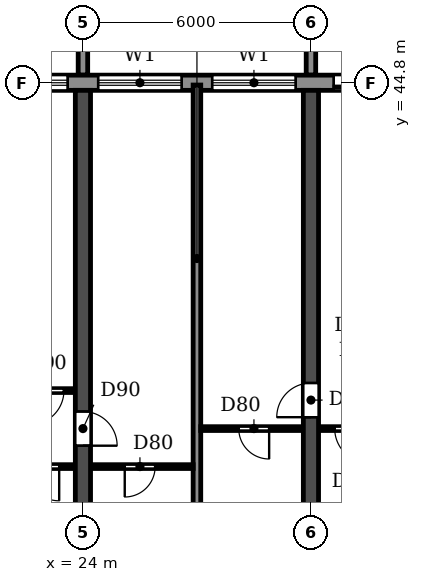
"""IFC4 building model, lengths in metres.
Left out: names, types, materials, properties, quantities, classifications, styles, units other than length and angle.
Written with IfcOpenShell. Run it as: python <this file> out.ifc"""

import sys

from ifc_helpers import new_model, si_unit, direction, frame, frame_2d, origin, place, context, subcontext, project, spatial, polyline, rectangle, outline, extrude, source, transform, mapped, element, fill, save


model = new_model("IFC4")
c1 = context("Model", 3, precision=1e-05, world=origin(), true_north=direction((0.0, 1.0)))
c2 = subcontext(c1, "Body", "Model", "MODEL_VIEW")
j1 = project(units=[si_unit("LENGTHUNIT", "METRE"), si_unit("PLANEANGLEUNIT", "RADIAN")], contexts=[c1])
p1 = place(None, origin())
s1 = spatial("IfcSite", under=j1, at=p1, CompositionType="ELEMENT")
p2 = place(p1, origin())
s2 = spatial("IfcBuilding", under=s1, at=p2, CompositionType="ELEMENT")
p3 = place(p2, frame((0.0, 0.0, 26.7)))
s3 = spatial("IfcBuildingStorey", under=s2, at=p3, CompositionType="ELEMENT", Elevation=26.7)
p4 = place(p3, frame((24.0, 30.55, 0.0), z_axis=(0.0, 0.0, 1.0), x_axis=(0.0, 1.0, 0.0)))
e1 = element("IfcWall", 1, at=p4, inside=s3, PredefinedType="SHEAR", context=c2, shape_type="SweptSolid", body=[
    extrude(rectangle(XDim=14.05, YDim=0.4, at=frame_2d((7.025, 0.0))), origin(), (0.0, 0.0, 1.0), 3.05),
])
p5 = place(p4, frame((4.7, 0.0, 0.0)))
e2 = element("IfcOpeningElement", 2, at=p5, cuts=e1, PredefinedType="OPENING", context=c2, shape_type="SweptSolid", body=[
    extrude(rectangle(XDim=0.9, YDim=2.1, at=frame_2d((0.45, 1.05))), frame((0.0, 0.21, 0.0), z_axis=(0.0, -1.0, 0.0), x_axis=(1.0, 0.0, 0.0)), (0.0, 0.0, 1.0), 0.42),
])
p6 = place(p3, frame((30.0, 30.55, 0.0), z_axis=(0.0, 0.0, 1.0), x_axis=(0.0, 1.0, 0.0)))
e3 = element("IfcWall", 3, at=p6, inside=s3, PredefinedType="SHEAR", context=c2, shape_type="SweptSolid", body=[
    extrude(rectangle(XDim=14.05, YDim=0.4, at=frame_2d((7.025, 0.0))), origin(), (0.0, 0.0, 1.0), 3.05),
])
p7 = place(p6, frame((5.45, 0.0, 0.0)))
e4 = element("IfcOpeningElement", 4, at=p7, cuts=e3, PredefinedType="OPENING", context=c2, shape_type="SweptSolid", body=[
    extrude(rectangle(XDim=0.9, YDim=2.1, at=frame_2d((0.45, 1.05))), frame((0.0, 0.21, 0.0), z_axis=(0.0, -1.0, 0.0), x_axis=(1.0, 0.0, 0.0)), (0.0, 0.0, 1.0), 0.42),
])
p8 = place(p3, frame((97.317, 44.8, 0.0), z_axis=(0.0, 0.0, 1.0), x_axis=(-1.0, 0.0, 0.0)))
e5 = element("IfcWall", 5, at=p8, inside=s3, PredefinedType="STANDARD", context=c2, shape_type="SweptSolid", body=[
    extrude(rectangle(XDim=92.634, YDim=0.4, at=frame_2d((46.317, 0.0))), origin(), (0.0, 0.0, 1.0), 3.05),
])
p9 = place(p8, frame((88.717, 0.0, 0.9)))
e6 = element("IfcOpeningElement", 6, at=p9, cuts=e5, PredefinedType="OPENING", context=c2, shape_type="SweptSolid", body=[
    extrude(rectangle(XDim=2.2, YDim=1.5, at=frame_2d((1.1, 0.75))), frame((0.0, 0.21, 0.0), z_axis=(0.0, -1.0, 0.0), x_axis=(1.0, 0.0, 0.0)), (0.0, 0.0, 1.0), 0.42),
])
p10 = place(p8, frame((85.917, 0.0, 0.0)))
e7 = element("IfcOpeningElement", 7, at=p10, cuts=e5, PredefinedType="OPENING", context=c2, shape_type="SweptSolid", body=[
    extrude(rectangle(XDim=1.8, YDim=2.4, at=frame_2d((0.9, 1.2))), frame((0.0, 0.21, 0.0), z_axis=(0.0, -1.0, 0.0), x_axis=(1.0, 0.0, 0.0)), (0.0, 0.0, 1.0), 0.42),
])
p11 = place(p8, frame((82.717, 0.0, 0.9)))
e8 = element("IfcOpeningElement", 8, at=p11, cuts=e5, PredefinedType="OPENING", context=c2, shape_type="SweptSolid", body=[
    extrude(rectangle(XDim=2.2, YDim=1.5, at=frame_2d((1.1, 0.75))), frame((0.0, 0.21, 0.0), z_axis=(0.0, -1.0, 0.0), x_axis=(1.0, 0.0, 0.0)), (0.0, 0.0, 1.0), 0.42),
])
p12 = place(p8, frame((79.717, 0.0, 0.9)))
e9 = element("IfcOpeningElement", 9, at=p12, cuts=e5, PredefinedType="OPENING", context=c2, shape_type="SweptSolid", body=[
    extrude(rectangle(XDim=2.2, YDim=1.5, at=frame_2d((1.1, 0.75))), frame((0.0, 0.21, 0.0), z_axis=(0.0, -1.0, 0.0), x_axis=(1.0, 0.0, 0.0)), (0.0, 0.0, 1.0), 0.42),
])
p13 = place(p8, frame((76.917, 0.0, 0.0)))
e10 = element("IfcOpeningElement", 10, at=p13, cuts=e5, PredefinedType="OPENING", context=c2, shape_type="SweptSolid", body=[
    extrude(rectangle(XDim=1.8, YDim=2.4, at=frame_2d((0.9, 1.2))), frame((0.0, 0.21, 0.0), z_axis=(0.0, -1.0, 0.0), x_axis=(1.0, 0.0, 0.0)), (0.0, 0.0, 1.0), 0.42),
])
p14 = place(p8, frame((73.717, 0.0, 0.9)))
e11 = element("IfcOpeningElement", 11, at=p14, cuts=e5, PredefinedType="OPENING", context=c2, shape_type="SweptSolid", body=[
    extrude(rectangle(XDim=2.2, YDim=1.5, at=frame_2d((1.1, 0.75))), frame((0.0, 0.21, 0.0), z_axis=(0.0, -1.0, 0.0), x_axis=(1.0, 0.0, 0.0)), (0.0, 0.0, 1.0), 0.42),
])
p15 = place(p8, frame((70.717, 0.0, 0.9)))
e12 = element("IfcOpeningElement", 12, at=p15, cuts=e5, PredefinedType="OPENING", context=c2, shape_type="SweptSolid", body=[
    extrude(rectangle(XDim=2.2, YDim=1.5, at=frame_2d((1.1, 0.75))), frame((0.0, 0.21, 0.0), z_axis=(0.0, -1.0, 0.0), x_axis=(1.0, 0.0, 0.0)), (0.0, 0.0, 1.0), 0.42),
])
p16 = place(p8, frame((67.717, 0.0, 0.9)))
e13 = element("IfcOpeningElement", 13, at=p16, cuts=e5, PredefinedType="OPENING", context=c2, shape_type="SweptSolid", body=[
    extrude(rectangle(XDim=2.2, YDim=1.5, at=frame_2d((1.1, 0.75))), frame((0.0, 0.21, 0.0), z_axis=(0.0, -1.0, 0.0), x_axis=(1.0, 0.0, 0.0)), (0.0, 0.0, 1.0), 0.42),
])
p17 = place(p8, frame((64.917, 0.0, 0.0)))
e14 = element("IfcOpeningElement", 14, at=p17, cuts=e5, PredefinedType="OPENING", context=c2, shape_type="SweptSolid", body=[
    extrude(rectangle(XDim=1.8, YDim=2.4, at=frame_2d((0.9, 1.2))), frame((0.0, 0.21, 0.0), z_axis=(0.0, -1.0, 0.0), x_axis=(1.0, 0.0, 0.0)), (0.0, 0.0, 1.0), 0.42),
])
p18 = place(p8, frame((61.717, 0.0, 0.9)))
e15 = element("IfcOpeningElement", 15, at=p18, cuts=e5, PredefinedType="OPENING", context=c2, shape_type="SweptSolid", body=[
    extrude(rectangle(XDim=2.2, YDim=1.5, at=frame_2d((1.1, 0.75))), frame((0.0, 0.21, 0.0), z_axis=(0.0, -1.0, 0.0), x_axis=(1.0, 0.0, 0.0)), (0.0, 0.0, 1.0), 0.42),
])
p19 = place(p8, frame((58.717, 0.0, 0.9)))
e16 = element("IfcOpeningElement", 16, at=p19, cuts=e5, PredefinedType="OPENING", context=c2, shape_type="SweptSolid", body=[
    extrude(rectangle(XDim=2.2, YDim=1.5, at=frame_2d((1.1, 0.75))), frame((0.0, 0.21, 0.0), z_axis=(0.0, -1.0, 0.0), x_axis=(1.0, 0.0, 0.0)), (0.0, 0.0, 1.0), 0.42),
])
p20 = place(p8, frame((55.917, 0.0, 0.0)))
e17 = element("IfcOpeningElement", 17, at=p20, cuts=e5, PredefinedType="OPENING", context=c2, shape_type="SweptSolid", body=[
    extrude(rectangle(XDim=1.8, YDim=2.4, at=frame_2d((0.9, 1.2))), frame((0.0, 0.21, 0.0), z_axis=(0.0, -1.0, 0.0), x_axis=(1.0, 0.0, 0.0)), (0.0, 0.0, 1.0), 0.42),
])
p21 = place(p8, frame((52.917, 0.0, 0.0)))
e18 = element("IfcOpeningElement", 18, at=p21, cuts=e5, PredefinedType="OPENING", context=c2, shape_type="SweptSolid", body=[
    extrude(rectangle(XDim=1.8, YDim=2.4, at=frame_2d((0.9, 1.2))), frame((0.0, 0.21, 0.0), z_axis=(0.0, -1.0, 0.0), x_axis=(1.0, 0.0, 0.0)), (0.0, 0.0, 1.0), 0.42),
])
p22 = place(p8, frame((49.717, 0.0, 0.9)))
e19 = element("IfcOpeningElement", 19, at=p22, cuts=e5, PredefinedType="OPENING", context=c2, shape_type="SweptSolid", body=[
    extrude(rectangle(XDim=2.2, YDim=1.5, at=frame_2d((1.1, 0.75))), frame((0.0, 0.21, 0.0), z_axis=(0.0, -1.0, 0.0), x_axis=(1.0, 0.0, 0.0)), (0.0, 0.0, 1.0), 0.42),
])
p23 = place(p8, frame((46.917, 0.0, 0.0)))
e20 = element("IfcOpeningElement", 20, at=p23, cuts=e5, PredefinedType="OPENING", context=c2, shape_type="SweptSolid", body=[
    extrude(rectangle(XDim=1.8, YDim=2.4, at=frame_2d((0.9, 1.2))), frame((0.0, 0.21, 0.0), z_axis=(0.0, -1.0, 0.0), x_axis=(1.0, 0.0, 0.0)), (0.0, 0.0, 1.0), 0.42),
])
p24 = place(p8, frame((43.717, 0.0, 0.9)))
e21 = element("IfcOpeningElement", 21, at=p24, cuts=e5, PredefinedType="OPENING", context=c2, shape_type="SweptSolid", body=[
    extrude(rectangle(XDim=2.2, YDim=1.5, at=frame_2d((1.1, 0.75))), frame((0.0, 0.21, 0.0), z_axis=(0.0, -1.0, 0.0), x_axis=(1.0, 0.0, 0.0)), (0.0, 0.0, 1.0), 0.42),
])
p25 = place(p8, frame((40.717, 0.0, 0.9)))
e22 = element("IfcOpeningElement", 22, at=p25, cuts=e5, PredefinedType="OPENING", context=c2, shape_type="SweptSolid", body=[
    extrude(rectangle(XDim=2.2, YDim=1.5, at=frame_2d((1.1, 0.75))), frame((0.0, 0.21, 0.0), z_axis=(0.0, -1.0, 0.0), x_axis=(1.0, 0.0, 0.0)), (0.0, 0.0, 1.0), 0.42),
])
p26 = place(p8, frame((37.917, 0.0, 0.0)))
e23 = element("IfcOpeningElement", 23, at=p26, cuts=e5, PredefinedType="OPENING", context=c2, shape_type="SweptSolid", body=[
    extrude(rectangle(XDim=1.8, YDim=2.4, at=frame_2d((0.9, 1.2))), frame((0.0, 0.21, 0.0), z_axis=(0.0, -1.0, 0.0), x_axis=(1.0, 0.0, 0.0)), (0.0, 0.0, 1.0), 0.42),
])
p27 = place(p8, frame((34.917, 0.0, 0.0)))
e24 = element("IfcOpeningElement", 24, at=p27, cuts=e5, PredefinedType="OPENING", context=c2, shape_type="SweptSolid", body=[
    extrude(rectangle(XDim=1.8, YDim=2.4, at=frame_2d((0.9, 1.2))), frame((0.0, 0.21, 0.0), z_axis=(0.0, -1.0, 0.0), x_axis=(1.0, 0.0, 0.0)), (0.0, 0.0, 1.0), 0.42),
])
p28 = place(p8, frame((31.717, 0.0, 0.9)))
e25 = element("IfcOpeningElement", 25, at=p28, cuts=e5, PredefinedType="OPENING", context=c2, shape_type="SweptSolid", body=[
    extrude(rectangle(XDim=2.2, YDim=1.5, at=frame_2d((1.1, 0.75))), frame((0.0, 0.21, 0.0), z_axis=(0.0, -1.0, 0.0), x_axis=(1.0, 0.0, 0.0)), (0.0, 0.0, 1.0), 0.42),
])
p29 = place(p8, frame((28.717, 0.0, 0.9)))
e26 = element("IfcOpeningElement", 26, at=p29, cuts=e5, PredefinedType="OPENING", context=c2, shape_type="SweptSolid", body=[
    extrude(rectangle(XDim=2.2, YDim=1.5, at=frame_2d((1.1, 0.75))), frame((0.0, 0.21, 0.0), z_axis=(0.0, -1.0, 0.0), x_axis=(1.0, 0.0, 0.0)), (0.0, 0.0, 1.0), 0.42),
])
p30 = place(p8, frame((25.717, 0.0, 0.9)))
e27 = element("IfcOpeningElement", 27, at=p30, cuts=e5, PredefinedType="OPENING", context=c2, shape_type="SweptSolid", body=[
    extrude(rectangle(XDim=2.2, YDim=1.5, at=frame_2d((1.1, 0.75))), frame((0.0, 0.21, 0.0), z_axis=(0.0, -1.0, 0.0), x_axis=(1.0, 0.0, 0.0)), (0.0, 0.0, 1.0), 0.42),
])
p31 = place(p8, frame((22.717, 0.0, 0.9)))
e28 = element("IfcOpeningElement", 28, at=p31, cuts=e5, PredefinedType="OPENING", context=c2, shape_type="SweptSolid", body=[
    extrude(rectangle(XDim=2.2, YDim=1.5, at=frame_2d((1.1, 0.75))), frame((0.0, 0.21, 0.0), z_axis=(0.0, -1.0, 0.0), x_axis=(1.0, 0.0, 0.0)), (0.0, 0.0, 1.0), 0.42),
])
p32 = place(p8, frame((19.917, 0.0, 0.0)))
e29 = element("IfcOpeningElement", 29, at=p32, cuts=e5, PredefinedType="OPENING", context=c2, shape_type="SweptSolid", body=[
    extrude(rectangle(XDim=1.8, YDim=2.4, at=frame_2d((0.9, 1.2))), frame((0.0, 0.21, 0.0), z_axis=(0.0, -1.0, 0.0), x_axis=(1.0, 0.0, 0.0)), (0.0, 0.0, 1.0), 0.42),
])
p33 = place(p8, frame((16.717, 0.0, 0.9)))
e30 = element("IfcOpeningElement", 30, at=p33, cuts=e5, PredefinedType="OPENING", context=c2, shape_type="SweptSolid", body=[
    extrude(rectangle(XDim=2.2, YDim=1.5, at=frame_2d((1.1, 0.75))), frame((0.0, 0.21, 0.0), z_axis=(0.0, -1.0, 0.0), x_axis=(1.0, 0.0, 0.0)), (0.0, 0.0, 1.0), 0.42),
])
p34 = place(p8, frame((13.717, 0.0, 0.9)))
e31 = element("IfcOpeningElement", 31, at=p34, cuts=e5, PredefinedType="OPENING", context=c2, shape_type="SweptSolid", body=[
    extrude(rectangle(XDim=2.2, YDim=1.5, at=frame_2d((1.1, 0.75))), frame((0.0, 0.21, 0.0), z_axis=(0.0, -1.0, 0.0), x_axis=(1.0, 0.0, 0.0)), (0.0, 0.0, 1.0), 0.42),
])
p35 = place(p8, frame((10.717, 0.0, 0.9)))
e32 = element("IfcOpeningElement", 32, at=p35, cuts=e5, PredefinedType="OPENING", context=c2, shape_type="SweptSolid", body=[
    extrude(rectangle(XDim=2.2, YDim=1.5, at=frame_2d((1.1, 0.75))), frame((0.0, 0.21, 0.0), z_axis=(0.0, -1.0, 0.0), x_axis=(1.0, 0.0, 0.0)), (0.0, 0.0, 1.0), 0.42),
])
p36 = place(p8, frame((7.917, 0.0, 0.0)))
e33 = element("IfcOpeningElement", 33, at=p36, cuts=e5, PredefinedType="OPENING", context=c2, shape_type="SweptSolid", body=[
    extrude(rectangle(XDim=1.8, YDim=2.4, at=frame_2d((0.9, 1.2))), frame((0.0, 0.21, 0.0), z_axis=(0.0, -1.0, 0.0), x_axis=(1.0, 0.0, 0.0)), (0.0, 0.0, 1.0), 0.42),
])
p37 = place(p8, frame((4.917, 0.0, 0.0)))
e34 = element("IfcOpeningElement", 34, at=p37, cuts=e5, PredefinedType="OPENING", context=c2, shape_type="SweptSolid", body=[
    extrude(rectangle(XDim=1.8, YDim=2.4, at=frame_2d((0.9, 1.2))), frame((0.0, 0.21, 0.0), z_axis=(0.0, -1.0, 0.0), x_axis=(1.0, 0.0, 0.0)), (0.0, 0.0, 1.0), 0.42),
])
p38 = place(p8, frame((1.717, 0.0, 0.9)))
e35 = element("IfcOpeningElement", 35, at=p38, cuts=e5, PredefinedType="OPENING", context=c2, shape_type="SweptSolid", body=[
    extrude(rectangle(XDim=2.2, YDim=1.5, at=frame_2d((1.1, 0.75))), frame((0.0, 0.21, 0.0), z_axis=(0.0, -1.0, 0.0), x_axis=(1.0, 0.0, 0.0)), (0.0, 0.0, 1.0), 0.42),
])
m1 = source(origin(), c2, "Body", "SweptSolid", [
    extrude(outline(polyline([(0.0, 0.0), (0.25, 0.0), (0.25, 3.1), (0.0, 3.1), (0.0, 0.0)])), origin(), (0.0, 0.0, 1.0), 3.1),
])
for number, where in (
    (36, (23.875, 45.0, 0.0)),
    (37, (29.875, 45.0, 0.0)),
):
    element("IfcWall", number, at=place(p3, frame(where)), inside=s3, PredefinedType="STANDARD", context=c2, shape_type="MappedRepresentation", body=[
        mapped(m1, transform((0.0, 0.0, 0.0))),
    ])
p39 = place(p3, frame((27.0, 30.56, 0.0), z_axis=(0.0, 0.0, 1.0), x_axis=(0.0, 1.0, 0.0)))
e38 = element("IfcWall", 38, at=p39, inside=s3, PredefinedType="PARTITIONING", context=c2, shape_type="SweptSolid", body=[
    extrude(rectangle(XDim=14.18, YDim=0.2, at=frame_2d((7.09, 0.0))), origin(), (0.0, 0.0, 1.0), 3.05),
])
p40 = place(p3, frame((21.8, 34.7, 0.0), z_axis=(0.0, 0.0, 1.0), x_axis=(1.0, 0.0, 0.0)))
e39 = element("IfcWall", 39, at=p40, inside=s3, PredefinedType="PARTITIONING", context=c2, shape_type="SweptSolid", body=[
    extrude(rectangle(XDim=1.99, YDim=0.1, at=frame_2d((0.995, 0.0))), origin(), (0.0, 0.0, 1.0), 3.05),
])
p41 = place(p40, frame((0.675, 0.0, 0.0)))
e40 = element("IfcOpeningElement", 40, at=p41, cuts=e39, PredefinedType="OPENING", context=c2, shape_type="SweptSolid", body=[
    extrude(rectangle(XDim=0.9, YDim=2.1, at=frame_2d((0.45, 1.05))), frame((0.0, 0.06, 0.0), z_axis=(0.0, -1.0, 0.0), x_axis=(1.0, 0.0, 0.0)), (0.0, 0.0, 1.0), 0.12),
])
p42 = place(p3, frame((24.21, 34.7, 0.0), z_axis=(0.0, 0.0, 1.0), x_axis=(1.0, 0.0, 0.0)))
e41 = element("IfcWall", 41, at=p42, inside=s3, PredefinedType="PARTITIONING", context=c2, shape_type="SweptSolid", body=[
    extrude(rectangle(XDim=2.69, YDim=0.1, at=frame_2d((1.345, 0.0))), origin(), (0.0, 0.0, 1.0), 3.05),
])
p43 = place(p42, frame((0.89, 0.0, 0.0)))
e42 = element("IfcOpeningElement", 42, at=p43, cuts=e41, PredefinedType="OPENING", context=c2, shape_type="SweptSolid", body=[
    extrude(rectangle(XDim=0.8, YDim=2.1, at=frame_2d((0.4, 1.05))), frame((0.0, 0.06, 0.0), z_axis=(0.0, -1.0, 0.0), x_axis=(1.0, 0.0, 0.0)), (0.0, 0.0, 1.0), 0.12),
])
p44 = place(p3, frame((27.1, 35.7, 0.0), z_axis=(0.0, 0.0, 1.0), x_axis=(1.0, 0.0, 0.0)))
e43 = element("IfcWall", 43, at=p44, inside=s3, PredefinedType="PARTITIONING", context=c2, shape_type="SweptSolid", body=[
    extrude(rectangle(XDim=2.69, YDim=0.1, at=frame_2d((1.345, 0.0))), origin(), (0.0, 0.0, 1.0), 3.05),
])
p45 = place(p44, frame((1.0, 0.0, 0.0)))
e44 = element("IfcOpeningElement", 44, at=p45, cuts=e43, PredefinedType="OPENING", context=c2, shape_type="SweptSolid", body=[
    extrude(rectangle(XDim=0.8, YDim=2.1, at=frame_2d((0.4, 1.05))), frame((0.0, 0.06, 0.0), z_axis=(0.0, -1.0, 0.0), x_axis=(1.0, 0.0, 0.0)), (0.0, 0.0, 1.0), 0.12),
])
p46 = place(p3, frame((30.21, 35.7, 0.0), z_axis=(0.0, 0.0, 1.0), x_axis=(1.0, 0.0, 0.0)))
e45 = element("IfcWall", 45, at=p46, inside=s3, PredefinedType="PARTITIONING", context=c2, shape_type="SweptSolid", body=[
    extrude(rectangle(XDim=1.99, YDim=0.1, at=frame_2d((0.995, 0.0))), origin(), (0.0, 0.0, 1.0), 3.05),
])
p47 = place(p46, frame((0.415, 0.0, 0.0)))
e46 = element("IfcOpeningElement", 46, at=p47, cuts=e45, PredefinedType="OPENING", context=c2, shape_type="SweptSolid", body=[
    extrude(rectangle(XDim=0.9, YDim=2.1, at=frame_2d((0.45, 1.05))), frame((0.0, 0.06, 0.0), z_axis=(0.0, -1.0, 0.0), x_axis=(1.0, 0.0, 0.0)), (0.0, 0.0, 1.0), 0.12),
])
p48 = place(p3, frame((20.95, 36.7, 0.0), z_axis=(0.0, 0.0, 1.0), x_axis=(1.0, 0.0, 0.0)))
e47 = element("IfcWall", 47, at=p48, inside=s3, PredefinedType="PARTITIONING", context=c2, shape_type="SweptSolid", body=[
    extrude(rectangle(XDim=2.84, YDim=0.1, at=frame_2d((1.42, 0.0))), origin(), (0.0, 0.0, 1.0), 3.05),
])
p49 = place(p48, frame((1.65, 0.0, 0.0)))
e48 = element("IfcOpeningElement", 48, at=p49, cuts=e47, PredefinedType="OPENING", context=c2, shape_type="SweptSolid", body=[
    extrude(rectangle(XDim=0.9, YDim=2.1, at=frame_2d((0.45, 1.05))), frame((0.0, 0.06, 0.0), z_axis=(0.0, -1.0, 0.0), x_axis=(1.0, 0.0, 0.0)), (0.0, 0.0, 1.0), 0.12),
])
p50 = place(p14, origin())
e49 = element("IfcWindow", 49, at=p50, inside=s3, PartitioningType="DOUBLE_PANEL_HORIZONTAL", PredefinedType="WINDOW", context=c2, shape_type="SweptSolid", body=[
    extrude(rectangle(XDim=2.2, YDim=1.5, at=frame_2d((1.1, 0.75))), frame((0.0, 0.03, 0.0), z_axis=(0.0, -1.0, 0.0), x_axis=(1.0, 0.0, 0.0)), (0.0, 0.0, 1.0), 0.06),
])
fill(e11, e49)
p51 = place(p15, origin())
e50 = element("IfcWindow", 50, at=p51, inside=s3, PartitioningType="DOUBLE_PANEL_HORIZONTAL", PredefinedType="WINDOW", context=c2, shape_type="SweptSolid", body=[
    extrude(rectangle(XDim=2.2, YDim=1.5, at=frame_2d((1.1, 0.75))), frame((0.0, 0.03, 0.0), z_axis=(0.0, -1.0, 0.0), x_axis=(1.0, 0.0, 0.0)), (0.0, 0.0, 1.0), 0.06),
])
fill(e12, e50)
p52 = place(p16, origin())
e51 = element("IfcWindow", 51, at=p52, inside=s3, PartitioningType="DOUBLE_PANEL_HORIZONTAL", PredefinedType="WINDOW", context=c2, shape_type="SweptSolid", body=[
    extrude(rectangle(XDim=2.2, YDim=1.5, at=frame_2d((1.1, 0.75))), frame((0.0, 0.03, 0.0), z_axis=(0.0, -1.0, 0.0), x_axis=(1.0, 0.0, 0.0)), (0.0, 0.0, 1.0), 0.06),
])
fill(e13, e51)
p53 = place(p17, origin())
e52 = element("IfcDoor", 52, at=p53, inside=s3, OperationType="DOUBLE_DOOR_SLIDING", PredefinedType="DOOR", context=c2, shape_type="SweptSolid", body=[
    extrude(rectangle(XDim=1.8, YDim=2.4, at=frame_2d((0.9, 1.2))), frame((0.0, 0.025, 0.0), z_axis=(0.0, -1.0, 0.0), x_axis=(1.0, 0.0, 0.0)), (0.0, 0.0, 1.0), 0.05),
])
fill(e14, e52)
p54 = place(p43, frame((0.8, 0.0, 0.0), z_axis=(0.0, 0.0, 1.0), x_axis=(-1.0, 0.0, 0.0)))
e53 = element("IfcDoor", 53, at=p54, inside=s3, OperationType="SINGLE_SWING_RIGHT", PredefinedType="DOOR", context=c2, shape_type="SweptSolid", body=[
    extrude(rectangle(XDim=0.8, YDim=2.1, at=frame_2d((0.4, 1.05))), frame((0.0, 0.025, 0.0), z_axis=(0.0, -1.0, 0.0), x_axis=(1.0, 0.0, 0.0)), (0.0, 0.0, 1.0), 0.05),
])
fill(e42, e53)
p55 = place(p41, frame((0.9, 0.0, 0.0), z_axis=(0.0, 0.0, 1.0), x_axis=(-1.0, 0.0, 0.0)))
e54 = element("IfcDoor", 54, at=p55, inside=s3, OperationType="SINGLE_SWING_LEFT", PredefinedType="DOOR", context=c2, shape_type="SweptSolid", body=[
    extrude(rectangle(XDim=0.9, YDim=2.1, at=frame_2d((0.45, 1.05))), frame((0.0, 0.025, 0.0), z_axis=(0.0, -1.0, 0.0), x_axis=(1.0, 0.0, 0.0)), (0.0, 0.0, 1.0), 0.05),
])
fill(e40, e54)
p56 = place(p49, frame((0.9, 0.0, 0.0), z_axis=(0.0, 0.0, 1.0), x_axis=(-1.0, 0.0, 0.0)))
e55 = element("IfcDoor", 55, at=p56, inside=s3, OperationType="SINGLE_SWING_RIGHT", PredefinedType="DOOR", context=c2, shape_type="SweptSolid", body=[
    extrude(rectangle(XDim=0.9, YDim=2.1, at=frame_2d((0.45, 1.05))), frame((0.0, 0.025, 0.0), z_axis=(0.0, -1.0, 0.0), x_axis=(1.0, 0.0, 0.0)), (0.0, 0.0, 1.0), 0.05),
])
fill(e48, e55)
p57 = place(p5, frame((0.9, 0.0, 0.0), z_axis=(0.0, 0.0, 1.0), x_axis=(-1.0, 0.0, 0.0)))
e56 = element("IfcDoor", 56, at=p57, inside=s3, OperationType="SINGLE_SWING_RIGHT", PredefinedType="DOOR", context=c2, shape_type="SweptSolid", body=[
    extrude(rectangle(XDim=0.9, YDim=2.1, at=frame_2d((0.45, 1.05))), frame((0.0, 0.025, 0.0), z_axis=(0.0, -1.0, 0.0), x_axis=(1.0, 0.0, 0.0)), (0.0, 0.0, 1.0), 0.05),
])
fill(e2, e56)
p58 = place(p45, frame((0.8, 0.0, 0.0), z_axis=(0.0, 0.0, 1.0), x_axis=(-1.0, 0.0, 0.0)))
e57 = element("IfcDoor", 57, at=p58, inside=s3, OperationType="SINGLE_SWING_LEFT", PredefinedType="DOOR", context=c2, shape_type="SweptSolid", body=[
    extrude(rectangle(XDim=0.8, YDim=2.1, at=frame_2d((0.4, 1.05))), frame((0.0, 0.025, 0.0), z_axis=(0.0, -1.0, 0.0), x_axis=(1.0, 0.0, 0.0)), (0.0, 0.0, 1.0), 0.05),
])
fill(e44, e57)
p59 = place(p7, origin())
e58 = element("IfcDoor", 58, at=p59, inside=s3, OperationType="SINGLE_SWING_LEFT", PredefinedType="DOOR", context=c2, shape_type="SweptSolid", body=[
    extrude(rectangle(XDim=0.9, YDim=2.1, at=frame_2d((0.45, 1.05))), frame((0.0, 0.025, 0.0), z_axis=(0.0, -1.0, 0.0), x_axis=(1.0, 0.0, 0.0)), (0.0, 0.0, 1.0), 0.05),
])
fill(e4, e58)
p60 = place(p47, frame((0.9, 0.0, 0.0), z_axis=(0.0, 0.0, 1.0), x_axis=(-1.0, 0.0, 0.0)))
e59 = element("IfcDoor", 59, at=p60, inside=s3, OperationType="SINGLE_SWING_LEFT", PredefinedType="DOOR", context=c2, shape_type="SweptSolid", body=[
    extrude(rectangle(XDim=0.9, YDim=2.1, at=frame_2d((0.45, 1.05))), frame((0.0, 0.025, 0.0), z_axis=(0.0, -1.0, 0.0), x_axis=(1.0, 0.0, 0.0)), (0.0, 0.0, 1.0), 0.05),
])
fill(e46, e59)
save(model, sys.argv[1])
